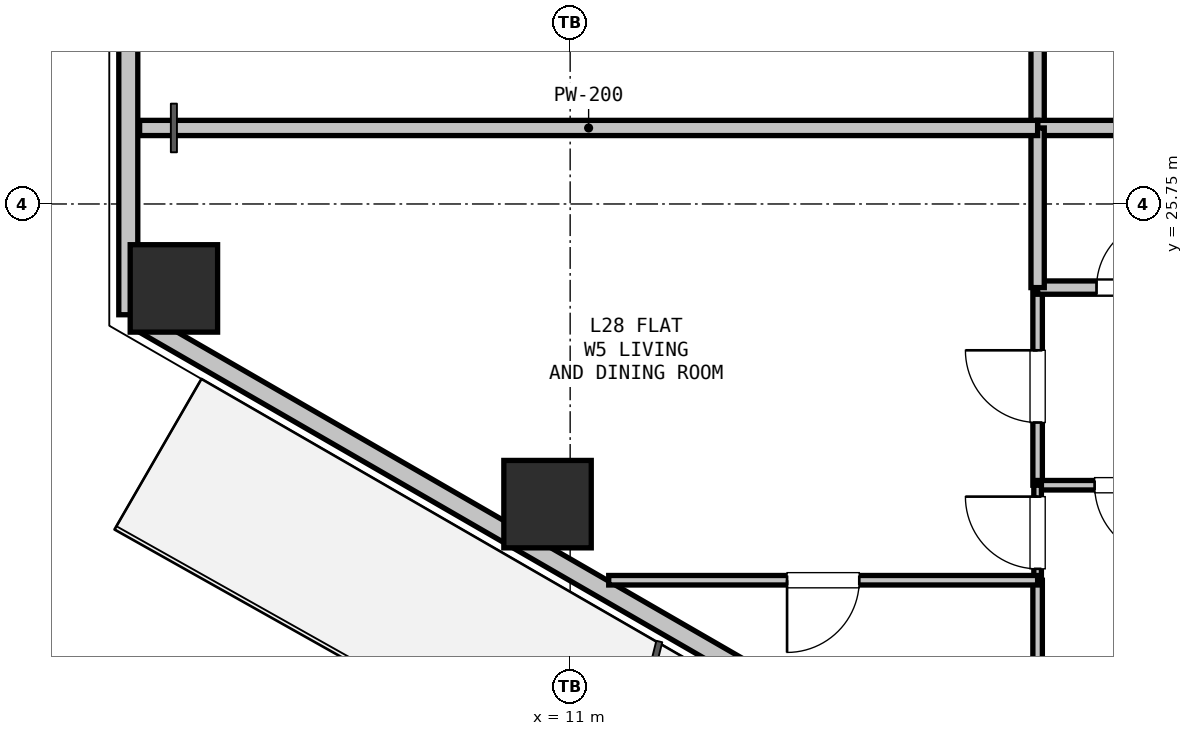
"""IFC4 building model, lengths in metres.
Left out: names, types, materials, properties, quantities, classifications, styles, units other than length and angle.
Written with IfcOpenShell. Run it as: python <this file> out.ifc"""

import sys

from ifc_helpers import new_model, si_unit, direction, frame, frame_2d, origin, origin_2d, place, context, subcontext, project, spatial, rectangle, hollow_rectangle, extrude, element, fill, save


model = new_model("IFC4")
c1 = context("Model", 3, precision=1e-05, world=origin(), true_north=direction((0.0, 1.0)))
c2 = subcontext(c1, "Body", "Model", "MODEL_VIEW")
j1 = project(units=[si_unit("LENGTHUNIT", "METRE"), si_unit("PLANEANGLEUNIT", "RADIAN")], contexts=[c1])
p1 = place(None, origin())
s1 = spatial("IfcSite", under=j1, at=p1, CompositionType="ELEMENT")
p2 = place(p1, origin())
s2 = spatial("IfcBuilding", under=s1, at=p2, CompositionType="ELEMENT")
p3 = place(p2, frame((0.0, 0.0, 103.2)))
s3 = spatial("IfcBuildingStorey", under=s2, at=p3, CompositionType="ELEMENT", Elevation=103.2)
for number, where, z_axis, x_axis in (
    (1, (10.702, 21.801, 0.0), (0.0, 0.0, 1.0), (1.0, 0.0, 0.0)),
    (2, (5.787, 24.639, 0.0), (0.0, 0.0, 1.0), (1.0, 0.0, 0.0)),
):
    element("IfcColumn", number, at=place(p3, frame(where, z_axis=z_axis, x_axis=x_axis)), inside=s3, PredefinedType="COLUMN", context=c2, shape_type="SweptSolid", body=[
        extrude(hollow_rectangle(XDim=1.15, YDim=1.15, WallThickness=0.032, at=origin_2d()), origin(), (0.0, 0.0, 1.0), 3.3),
    ])
p4 = place(p3, frame((5.187, 24.293, 0.0), z_axis=(0.0, 0.0, 1.0), x_axis=(0.0, 1.0, 0.0)))
e3 = element("IfcWall", 3, at=p4, inside=s3, PredefinedType="SOLIDWALL", context=c2, shape_type="SweptSolid", body=[
    extrude(rectangle(XDim=4.915, YDim=0.25, at=frame_2d((2.457, 0.0))), origin(), (0.0, 0.0, 1.0), 2.67),
])
p5 = place(p3, frame((15.648, 18.253, 0.0), z_axis=(0.0, 0.0, 1.0), x_axis=(-0.866023023012, 0.500004123596, 0.0)))
e4 = element("IfcWall", 4, at=p5, inside=s3, PredefinedType="SOLIDWALL", context=c2, shape_type="SweptSolid", body=[
    extrude(rectangle(XDim=11.93, YDim=0.25, at=frame_2d((5.965, 0.0))), origin(), (0.0, 0.0, 1.0), 2.67),
])
p6 = place(p5, frame((1.706, 0.0, 0.9)))
e5 = element("IfcOpeningElement", 5, at=p6, cuts=e4, PredefinedType="OPENING", context=c2, shape_type="SweptSolid", body=[
    extrude(rectangle(XDim=1.2, YDim=1.4, at=frame_2d((0.6, 0.7))), frame((0.0, 0.135, 0.0), z_axis=(0.0, -1.0, 0.0), x_axis=(1.0, 0.0, 0.0)), (0.0, 0.0, 1.0), 0.27),
])
p7 = place(p3, frame((17.15, 22.05, 0.0), z_axis=(0.0, 0.0, 1.0), x_axis=(0.0, 1.0, 0.0)))
e6 = element("IfcWall", 6, at=p7, inside=s3, PredefinedType="PARTITIONING", context=c2, shape_type="SweptSolid", body=[
    extrude(rectangle(XDim=2.6, YDim=0.125, at=frame_2d((1.3, 0.0))), origin(), (0.0, 0.0, 1.0), 3.05),
])
p8 = place(p7, frame((0.825, 0.0, 0.0)))
e7 = element("IfcOpeningElement", 7, at=p8, cuts=e6, PredefinedType="OPENING", context=c2, shape_type="SweptSolid", body=[
    extrude(rectangle(XDim=0.95, YDim=2.1, at=frame_2d((0.475, 1.05))), frame((0.0, 0.073, 0.0), z_axis=(0.0, -1.0, 0.0), x_axis=(1.0, 0.0, 0.0)), (0.0, 0.0, 1.0), 0.145),
])
p9 = place(p3, frame((17.15, 24.65, 0.0), z_axis=(0.0, 0.0, 1.0), x_axis=(1.0, 0.0, 0.0)))
e8 = element("IfcWall", 8, at=p9, inside=s3, PredefinedType="PLUMBINGWALL", context=c2, shape_type="SweptSolid", body=[
    extrude(rectangle(XDim=2.45, YDim=0.175, at=frame_2d((1.225, 0.0))), origin(), (0.0, 0.0, 1.0), 3.05),
])
p10 = place(p9, frame((0.775, 0.0, 0.0)))
e9 = element("IfcOpeningElement", 9, at=p10, cuts=e8, PredefinedType="OPENING", context=c2, shape_type="SweptSolid", body=[
    extrude(rectangle(XDim=0.9, YDim=2.1, at=frame_2d((0.45, 1.05))), frame((0.0, 0.097, 0.0), z_axis=(0.0, -1.0, 0.0), x_axis=(1.0, 0.0, 0.0)), (0.0, 0.0, 1.0), 0.195),
])
p11 = place(p3, frame((19.6, 22.05, 0.0), z_axis=(0.0, 0.0, 1.0), x_axis=(-1.0, 0.0, 0.0)))
e10 = element("IfcWall", 10, at=p11, inside=s3, PredefinedType="PARTITIONING", context=c2, shape_type="SweptSolid", body=[
    extrude(rectangle(XDim=2.45, YDim=0.125, at=frame_2d((1.225, 0.0))), origin(), (0.0, 0.0, 1.0), 3.05),
])
p12 = place(p11, frame((0.75, 0.0, 0.0)))
e11 = element("IfcOpeningElement", 11, at=p12, cuts=e10, PredefinedType="OPENING", context=c2, shape_type="SweptSolid", body=[
    extrude(rectangle(XDim=0.95, YDim=2.1, at=frame_2d((0.475, 1.05))), frame((0.0, 0.073, 0.0), z_axis=(0.0, -1.0, 0.0), x_axis=(1.0, 0.0, 0.0)), (0.0, 0.0, 1.0), 0.145),
])
p13 = place(p3, frame((17.15, 26.75, 0.0), z_axis=(0.0, 0.0, 1.0), x_axis=(0.0, 1.0, 0.0)))
e12 = element("IfcWall", 12, at=p13, inside=s3, PredefinedType="PLUMBINGWALL", context=c2, shape_type="SweptSolid", body=[
    extrude(rectangle(XDim=2.1, YDim=0.175, at=frame_2d((1.05, 0.0))), origin(), (0.0, 0.0, 1.0), 3.05),
])
p14 = place(p3, frame((19.6, 26.75, 0.0), z_axis=(0.0, 0.0, 1.0), x_axis=(-1.0, 0.0, 0.0)))
e13 = element("IfcWall", 13, at=p14, inside=s3, PredefinedType="PARTITIONING", context=c2, shape_type="SweptSolid", body=[
    extrude(rectangle(XDim=2.45, YDim=0.2, at=frame_2d((1.225, 0.0))), origin(), (0.0, 0.0, 1.0), 3.05),
])
p15 = place(p3, frame((17.15, 24.65, 0.0), z_axis=(0.0, 0.0, 1.0), x_axis=(0.0, 1.0, 0.0)))
e14 = element("IfcWall", 14, at=p15, inside=s3, PredefinedType="PLUMBINGWALL", context=c2, shape_type="SweptSolid", body=[
    extrude(rectangle(XDim=2.1, YDim=0.175, at=frame_2d((1.05, 0.0))), origin(), (0.0, 0.0, 1.0), 3.05),
])
p16 = place(p3, frame((17.15, 17.737, 0.0), z_axis=(0.0, 0.0, 1.0), x_axis=(0.0, 1.0, 0.0)))
e15 = element("IfcWall", 15, at=p16, inside=s3, PredefinedType="PARTITIONING", context=c2, shape_type="SweptSolid", body=[
    extrude(rectangle(XDim=3.063, YDim=0.125, at=frame_2d((1.532, 0.0))), origin(), (0.0, 0.0, 1.0), 2.365),
])
p17 = place(p3, frame((17.15, 20.8, 0.0), z_axis=(0.0, 0.0, 1.0), x_axis=(0.0, 1.0, 0.0)))
e16 = element("IfcWall", 16, at=p17, inside=s3, PredefinedType="PARTITIONING", context=c2, shape_type="SweptSolid", body=[
    extrude(rectangle(XDim=1.25, YDim=0.1, at=frame_2d((0.625, 0.0))), origin(), (0.0, 0.0, 1.0), 2.423),
])
p18 = place(p17, frame((0.15, 0.0, 0.0)))
e17 = element("IfcOpeningElement", 17, at=p18, cuts=e16, PredefinedType="OPENING", context=c2, shape_type="SweptSolid", body=[
    extrude(rectangle(XDim=0.95, YDim=2.1, at=frame_2d((0.475, 1.05))), frame((0.0, 0.06, 0.0), z_axis=(0.0, -1.0, 0.0), x_axis=(1.0, 0.0, 0.0)), (0.0, 0.0, 1.0), 0.12),
])
p19 = place(p3, frame((17.15, 26.75, 0.0), z_axis=(0.0, 0.0, 1.0), x_axis=(-1.0, 0.0, 0.0)))
e18 = element("IfcWall", 18, at=p19, inside=s3, PredefinedType="PARTITIONING", context=c2, shape_type="SweptSolid", body=[
    extrude(rectangle(XDim=11.814, YDim=0.2, at=frame_2d((5.907, 0.0))), origin(), (0.0, 0.0, 1.0), 2.715),
])
p20 = place(p3, frame((17.15, 20.8, 0.0), z_axis=(0.0, 0.0, 1.0), x_axis=(-1.0, 0.0, 0.0)))
e19 = element("IfcWall", 19, at=p20, inside=s3, PredefinedType="PARTITIONING", context=c2, shape_type="SweptSolid", body=[
    extrude(rectangle(XDim=5.643, YDim=0.125, at=frame_2d((2.821, 0.0))), origin(), (0.0, 0.0, 1.0), 2.365),
])
p21 = place(p20, frame((2.346, 0.0, 0.0)))
e20 = element("IfcOpeningElement", 20, at=p21, cuts=e19, PredefinedType="OPENING", context=c2, shape_type="SweptSolid", body=[
    extrude(rectangle(XDim=0.95, YDim=2.1, at=frame_2d((0.475, 1.05))), frame((0.0, 0.073, 0.0), z_axis=(0.0, -1.0, 0.0), x_axis=(1.0, 0.0, 0.0)), (0.0, 0.0, 1.0), 0.145),
])
p22 = place(p10, origin())
e21 = element("IfcDoor", 21, at=p22, inside=s3, OperationType="SINGLE_SWING_RIGHT", PredefinedType="DOOR", context=c2, shape_type="SweptSolid", body=[
    extrude(rectangle(XDim=0.9, YDim=2.1, at=frame_2d((0.45, 1.05))), frame((0.0, 0.025, 0.0), z_axis=(0.0, -1.0, 0.0), x_axis=(1.0, 0.0, 0.0)), (0.0, 0.0, 1.0), 0.05),
])
fill(e9, e21)
p23 = place(p12, origin())
e22 = element("IfcDoor", 22, at=p23, inside=s3, OperationType="SINGLE_SWING_LEFT", PredefinedType="DOOR", context=c2, shape_type="SweptSolid", body=[
    extrude(rectangle(XDim=0.95, YDim=2.1, at=frame_2d((0.475, 1.05))), frame((0.0, 0.025, 0.0), z_axis=(0.0, -1.0, 0.0), x_axis=(1.0, 0.0, 0.0)), (0.0, 0.0, 1.0), 0.05),
])
fill(e11, e22)
p24 = place(p8, origin())
e23 = element("IfcDoor", 23, at=p24, inside=s3, OperationType="SINGLE_SWING_RIGHT", PredefinedType="DOOR", context=c2, shape_type="SweptSolid", body=[
    extrude(rectangle(XDim=0.95, YDim=2.1, at=frame_2d((0.475, 1.05))), frame((0.0, 0.025, 0.0), z_axis=(0.0, -1.0, 0.0), x_axis=(1.0, 0.0, 0.0)), (0.0, 0.0, 1.0), 0.05),
])
fill(e7, e23)
p25 = place(p18, origin())
e24 = element("IfcDoor", 24, at=p25, inside=s3, OperationType="SINGLE_SWING_RIGHT", PredefinedType="DOOR", context=c2, shape_type="SweptSolid", body=[
    extrude(rectangle(XDim=0.95, YDim=2.1, at=frame_2d((0.475, 1.05))), frame((0.0, 0.025, 0.0), z_axis=(0.0, -1.0, 0.0), x_axis=(1.0, 0.0, 0.0)), (0.0, 0.0, 1.0), 0.05),
])
fill(e17, e24)
p26 = place(p21, origin())
e25 = element("IfcDoor", 25, at=p26, inside=s3, OperationType="SINGLE_SWING_RIGHT", PredefinedType="DOOR", context=c2, shape_type="SweptSolid", body=[
    extrude(rectangle(XDim=0.95, YDim=2.1, at=frame_2d((0.475, 1.05))), frame((0.0, 0.025, 0.0), z_axis=(0.0, -1.0, 0.0), x_axis=(1.0, 0.0, 0.0)), (0.0, 0.0, 1.0), 0.05),
])
fill(e20, e25)
save(model, sys.argv[1])
